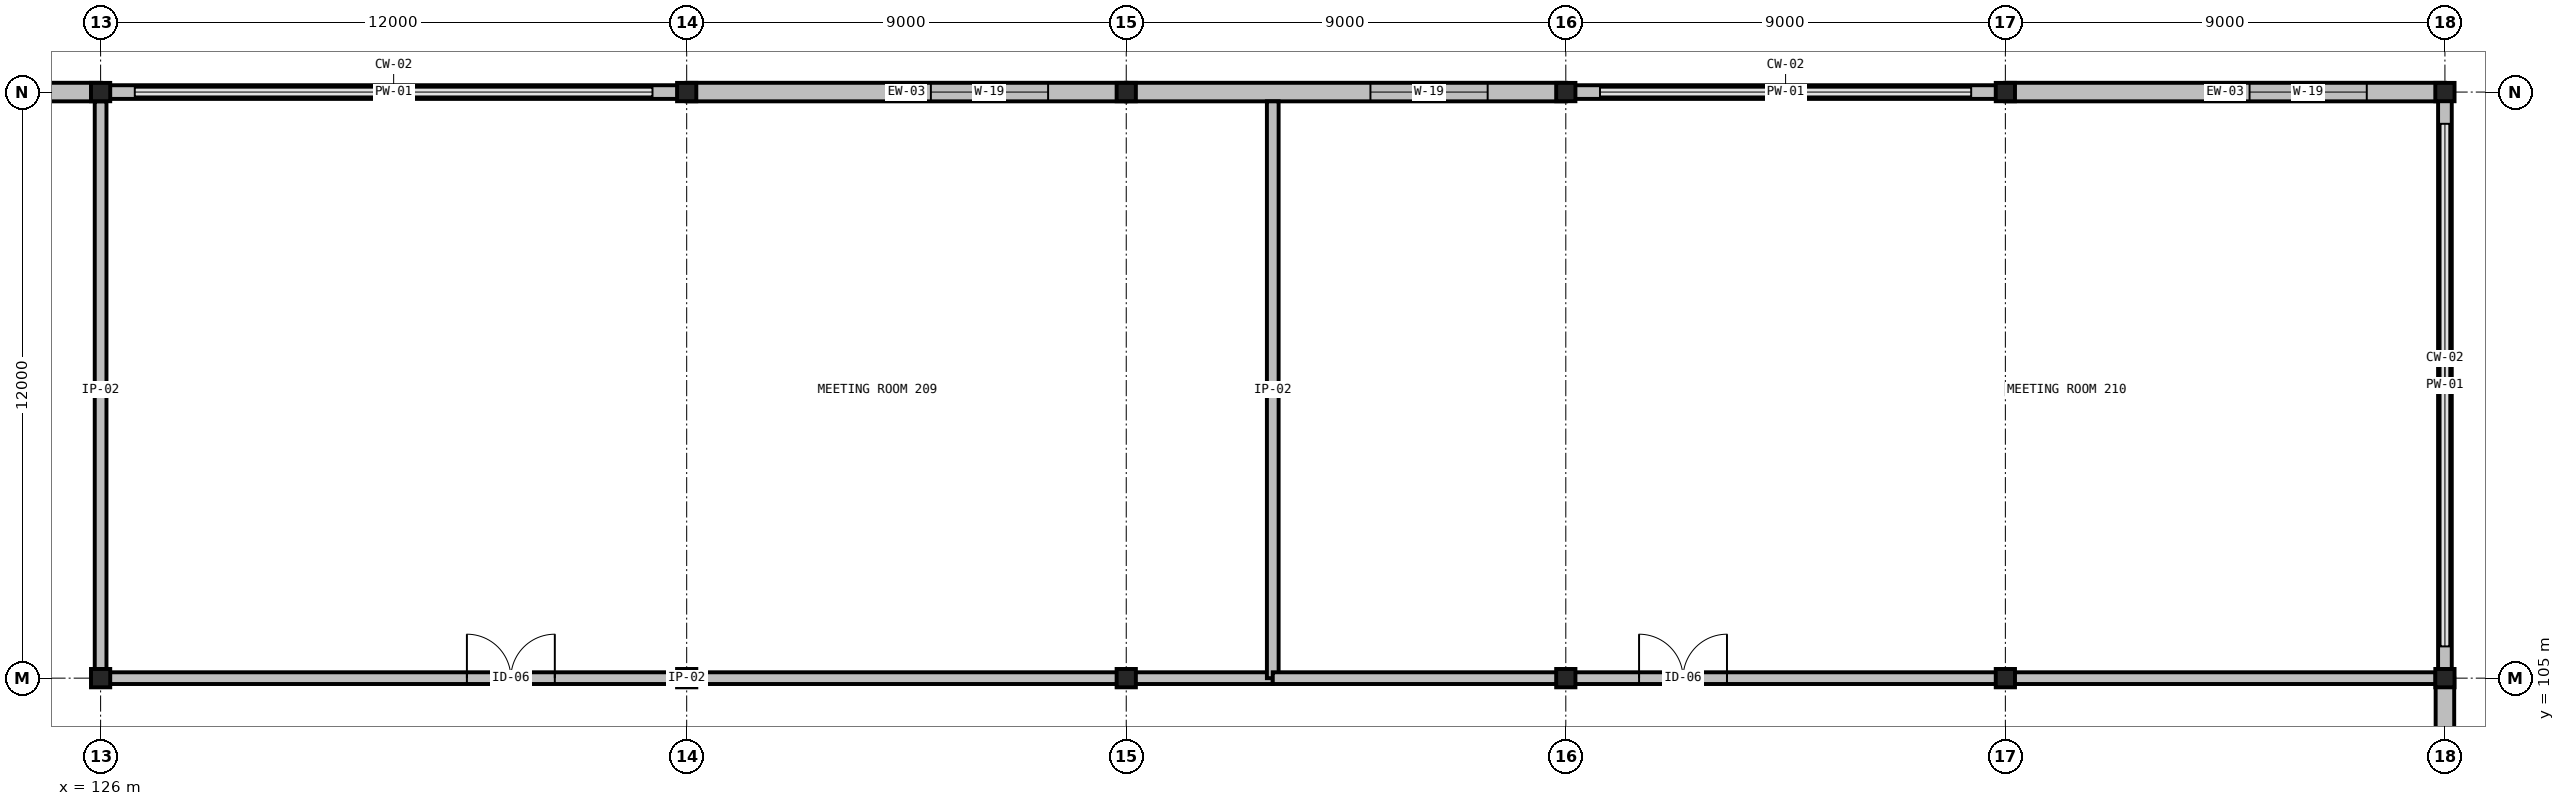
"""IFC4 building model, lengths in metres.
Left out: names, types, materials, properties, quantities, classifications, styles, units other than length and angle.
Written with IfcOpenShell. Run it as: python <this file> out.ifc"""

import sys

from ifc_helpers import new_model, si_unit, direction, frame, frame_2d, origin, origin_2d, place, context, subcontext, project, spatial, rectangle, i_section, extrude, element, fill, save


model = new_model("IFC4")
c1 = context("Model", 3, precision=1e-05, world=origin(), true_north=direction((0.0, 1.0)))
c2 = subcontext(c1, "Body", "Model", "MODEL_VIEW")
j1 = project(units=[si_unit("LENGTHUNIT", "METRE"), si_unit("PLANEANGLEUNIT", "RADIAN")], contexts=[c1])
p1 = place(None, origin())
s1 = spatial("IfcSite", under=j1, at=p1, CompositionType="ELEMENT")
p2 = place(p1, origin())
s2 = spatial("IfcBuilding", under=s1, at=p2, CompositionType="ELEMENT")
p3 = place(p2, frame((0.0, 0.0, 12.0)))
s3 = spatial("IfcBuildingStorey", under=s2, at=p3, CompositionType="ELEMENT", Elevation=12.0)
for number, where, z_axis, x_axis in (
    (1, (126.0, 105.0, 0.0), (0.0, 0.0, 1.0), (1.0, 0.0, 0.0)),
    (2, (126.0, 117.0, 0.0), (0.0, 0.0, 1.0), (1.0, 0.0, 0.0)),
    (3, (138.0, 105.0, 0.0), (0.0, 0.0, 1.0), (1.0, 0.0, 0.0)),
    (4, (138.0, 117.0, 0.0), (0.0, 0.0, 1.0), (1.0, 0.0, 0.0)),
    (5, (147.0, 105.0, 0.0), (0.0, 0.0, 1.0), (1.0, 0.0, 0.0)),
    (6, (147.0, 117.0, 0.0), (0.0, 0.0, 1.0), (1.0, 0.0, 0.0)),
    (7, (156.0, 105.0, 0.0), (0.0, 0.0, 1.0), (1.0, 0.0, 0.0)),
    (8, (156.0, 117.0, 0.0), (0.0, 0.0, 1.0), (1.0, 0.0, 0.0)),
    (9, (165.0, 105.0, 0.0), (0.0, 0.0, 1.0), (1.0, 0.0, 0.0)),
    (10, (165.0, 117.0, 0.0), (0.0, 0.0, 1.0), (1.0, 0.0, 0.0)),
    (11, (174.0, 105.0, 0.0), (0.0, 0.0, 1.0), (1.0, 0.0, 0.0)),
    (12, (174.0, 117.0, 0.0), (0.0, 0.0, 1.0), (1.0, 0.0, 0.0)),
):
    element("IfcColumn", number, at=place(p3, frame(where, z_axis=z_axis, x_axis=x_axis)), inside=s3, PredefinedType="COLUMN", context=c2, shape_type="SweptSolid", body=[
        extrude(i_section(OverallWidth=0.394, OverallDepth=0.375, WebThickness=0.017, FlangeThickness=0.028, FilletRadius=0.031, at=origin_2d()), origin(), (0.0, 0.0, 1.0), 6.0),
    ])
p4 = place(p3, frame((126.0, 117.0, 0.0), z_axis=(0.0, 0.0, 1.0), x_axis=(-1.0, 0.0, 0.0)))
e13 = element("IfcWall", 13, at=p4, inside=s3, PredefinedType="STANDARD", context=c2, shape_type="SweptSolid", body=[
    extrude(rectangle(XDim=12.0, YDim=0.38, at=frame_2d((6.0, 0.0))), origin(), (0.0, 0.0, 1.0), 4.746),
])
p5 = place(p4, frame((1.6, 0.0, 0.9)))
e14 = element("IfcOpeningElement", 14, at=p5, cuts=e13, PredefinedType="OPENING", context=c2, shape_type="SweptSolid", body=[
    extrude(rectangle(XDim=2.4, YDim=2.15, at=frame_2d((1.2, 1.075))), frame((0.0, 0.205, 0.0), z_axis=(0.0, -1.0, 0.0), x_axis=(1.0, 0.0, 0.0)), (0.0, 0.0, 1.0), 0.41),
])
p6 = place(p3, frame((138.0, 117.0, 0.0), z_axis=(0.0, 0.0, 1.0), x_axis=(-1.0, 0.0, 0.0)))
e15 = element("IfcWall", 15, at=p6, inside=s3, PredefinedType="PARAPET", context=c2, shape_type="SweptSolid", body=[
    extrude(rectangle(XDim=12.0, YDim=0.28, at=frame_2d((6.0, 0.0))), origin(), (0.0, 0.0, 1.0), 0.2),
])
p7 = place(p3, frame((147.0, 117.0, 0.0), z_axis=(0.0, 0.0, 1.0), x_axis=(-1.0, 0.0, 0.0)))
e16 = element("IfcWall", 16, at=p7, inside=s3, PredefinedType="STANDARD", context=c2, shape_type="SweptSolid", body=[
    extrude(rectangle(XDim=9.0, YDim=0.38, at=frame_2d((4.5, 0.0))), origin(), (0.0, 0.0, 1.0), 4.746),
])
p8 = place(p7, frame((1.6, 0.0, 0.9)))
e17 = element("IfcOpeningElement", 17, at=p8, cuts=e16, PredefinedType="OPENING", context=c2, shape_type="SweptSolid", body=[
    extrude(rectangle(XDim=2.4, YDim=2.15, at=frame_2d((1.2, 1.075))), frame((0.0, 0.205, 0.0), z_axis=(0.0, -1.0, 0.0), x_axis=(1.0, 0.0, 0.0)), (0.0, 0.0, 1.0), 0.41),
])
p9 = place(p3, frame((156.0, 117.0, 0.0), z_axis=(0.0, 0.0, 1.0), x_axis=(-1.0, 0.0, 0.0)))
e18 = element("IfcWall", 18, at=p9, inside=s3, PredefinedType="STANDARD", context=c2, shape_type="SweptSolid", body=[
    extrude(rectangle(XDim=9.0, YDim=0.38, at=frame_2d((4.5, 0.0))), origin(), (0.0, 0.0, 1.0), 4.746),
])
p10 = place(p9, frame((1.6, 0.0, 0.9)))
e19 = element("IfcOpeningElement", 19, at=p10, cuts=e18, PredefinedType="OPENING", context=c2, shape_type="SweptSolid", body=[
    extrude(rectangle(XDim=2.4, YDim=2.15, at=frame_2d((1.2, 1.075))), frame((0.0, 0.205, 0.0), z_axis=(0.0, -1.0, 0.0), x_axis=(1.0, 0.0, 0.0)), (0.0, 0.0, 1.0), 0.41),
])
p11 = place(p3, frame((165.0, 117.0, 0.0), z_axis=(0.0, 0.0, 1.0), x_axis=(-1.0, 0.0, 0.0)))
e20 = element("IfcWall", 20, at=p11, inside=s3, PredefinedType="PARAPET", context=c2, shape_type="SweptSolid", body=[
    extrude(rectangle(XDim=9.0, YDim=0.28, at=frame_2d((4.5, 0.0))), origin(), (0.0, 0.0, 1.0), 0.2),
])
p12 = place(p3, frame((174.0, 117.0, 0.0), z_axis=(0.0, 0.0, 1.0), x_axis=(-1.0, 0.0, 0.0)))
e21 = element("IfcWall", 21, at=p12, inside=s3, PredefinedType="STANDARD", context=c2, shape_type="SweptSolid", body=[
    extrude(rectangle(XDim=9.0, YDim=0.38, at=frame_2d((4.5, 0.0))), origin(), (0.0, 0.0, 1.0), 4.746),
])
p13 = place(p12, frame((1.6, 0.0, 0.9)))
e22 = element("IfcOpeningElement", 22, at=p13, cuts=e21, PredefinedType="OPENING", context=c2, shape_type="SweptSolid", body=[
    extrude(rectangle(XDim=2.4, YDim=2.15, at=frame_2d((1.2, 1.075))), frame((0.0, 0.205, 0.0), z_axis=(0.0, -1.0, 0.0), x_axis=(1.0, 0.0, 0.0)), (0.0, 0.0, 1.0), 0.41),
])
p14 = place(p3, frame((174.0, 96.0, 0.0), z_axis=(0.0, 0.0, 1.0), x_axis=(0.0, 1.0, 0.0)))
e23 = element("IfcWall", 23, at=p14, inside=s3, PredefinedType="STANDARD", context=c2, shape_type="SweptSolid", body=[
    extrude(rectangle(XDim=9.0, YDim=0.38, at=frame_2d((4.5, 0.0))), origin(), (0.0, 0.0, 1.0), 5.239),
])
p15 = place(p3, frame((174.0, 105.0, 0.0), z_axis=(0.0, 0.0, 1.0), x_axis=(0.0, 1.0, 0.0)))
e24 = element("IfcWall", 24, at=p15, inside=s3, PredefinedType="PARAPET", context=c2, shape_type="SweptSolid", body=[
    extrude(rectangle(XDim=12.0, YDim=0.28, at=frame_2d((6.0, 0.0))), origin(), (0.0, 0.0, 1.0), 0.2),
])
p16 = place(p3, frame((126.0, 105.0, 0.0), z_axis=(0.0, 0.0, 1.0), x_axis=(1.0, 0.0, 0.0)))
e25 = element("IfcWall", 25, at=p16, inside=s3, PredefinedType="PARTITIONING", context=c2, shape_type="SweptSolid", body=[
    extrude(rectangle(XDim=24.0, YDim=0.24, at=frame_2d((12.0, 0.0))), origin(), (0.0, 0.0, 1.0), 4.872),
])
p17 = place(p16, frame((7.5, 0.0, 0.0)))
e26 = element("IfcOpeningElement", 26, at=p17, cuts=e25, PredefinedType="OPENING", context=c2, shape_type="SweptSolid", body=[
    extrude(rectangle(XDim=1.8, YDim=2.3, at=frame_2d((0.9, 1.15))), frame((0.0, 0.135, 0.0), z_axis=(0.0, -1.0, 0.0), x_axis=(1.0, 0.0, 0.0)), (0.0, 0.0, 1.0), 0.27),
])
p18 = place(p3, frame((150.0, 105.0, 0.0), z_axis=(0.0, 0.0, 1.0), x_axis=(0.0, 1.0, 0.0)))
e27 = element("IfcWall", 27, at=p18, inside=s3, PredefinedType="PARTITIONING", context=c2, shape_type="SweptSolid", body=[
    extrude(rectangle(XDim=11.81, YDim=0.24, at=frame_2d((5.905, 0.0))), origin(), (0.0, 0.0, 1.0), 5.65),
])
p19 = place(p3, frame((126.0, 116.81, 0.0), z_axis=(0.0, 0.0, 1.0), x_axis=(0.0, -1.0, 0.0)))
e28 = element("IfcWall", 28, at=p19, inside=s3, PredefinedType="PARTITIONING", context=c2, shape_type="SweptSolid", body=[
    extrude(rectangle(XDim=11.81, YDim=0.24, at=frame_2d((5.905, 0.0))), origin(), (0.0, 0.0, 1.0), 4.8),
])
p20 = place(p3, frame((150.0, 105.0, 0.0), z_axis=(0.0, 0.0, 1.0), x_axis=(1.0, 0.0, 0.0)))
e29 = element("IfcWall", 29, at=p20, inside=s3, PredefinedType="PARTITIONING", context=c2, shape_type="SweptSolid", body=[
    extrude(rectangle(XDim=23.81, YDim=0.24, at=frame_2d((11.905, 0.0))), origin(), (0.0, 0.0, 1.0), 4.957),
])
p21 = place(p20, frame((7.5, 0.0, 0.0)))
e30 = element("IfcOpeningElement", 30, at=p21, cuts=e29, PredefinedType="OPENING", context=c2, shape_type="SweptSolid", body=[
    extrude(rectangle(XDim=1.8, YDim=2.3, at=frame_2d((0.9, 1.15))), frame((0.0, 0.135, 0.0), z_axis=(0.0, -1.0, 0.0), x_axis=(1.0, 0.0, 0.0)), (0.0, 0.0, 1.0), 0.27),
])
p22 = place(p8, origin())
e31 = element("IfcWindow", 31, at=p22, inside=s3, PartitioningType="DOUBLE_PANEL_VERTICAL", PredefinedType="WINDOW", context=c2, shape_type="SweptSolid", body=[
    extrude(rectangle(XDim=2.4, YDim=2.15, at=frame_2d((1.2, 1.075))), frame((0.0, 0.03, 0.0), z_axis=(0.0, -1.0, 0.0), x_axis=(1.0, 0.0, 0.0)), (0.0, 0.0, 1.0), 0.06),
])
fill(e17, e31)
p23 = place(p10, origin())
e32 = element("IfcWindow", 32, at=p23, inside=s3, PartitioningType="DOUBLE_PANEL_VERTICAL", PredefinedType="WINDOW", context=c2, shape_type="SweptSolid", body=[
    extrude(rectangle(XDim=2.4, YDim=2.15, at=frame_2d((1.2, 1.075))), frame((0.0, 0.03, 0.0), z_axis=(0.0, -1.0, 0.0), x_axis=(1.0, 0.0, 0.0)), (0.0, 0.0, 1.0), 0.06),
])
fill(e19, e32)
p24 = place(p13, origin())
e33 = element("IfcWindow", 33, at=p24, inside=s3, PartitioningType="DOUBLE_PANEL_VERTICAL", PredefinedType="WINDOW", context=c2, shape_type="SweptSolid", body=[
    extrude(rectangle(XDim=2.4, YDim=2.15, at=frame_2d((1.2, 1.075))), frame((0.0, 0.03, 0.0), z_axis=(0.0, -1.0, 0.0), x_axis=(1.0, 0.0, 0.0)), (0.0, 0.0, 1.0), 0.06),
])
fill(e22, e33)
p25 = place(p17, origin())
e34 = element("IfcDoor", 34, at=p25, inside=s3, OperationType="DOUBLE_DOOR_SINGLE_SWING", PredefinedType="DOOR", context=c2, shape_type="SweptSolid", body=[
    extrude(rectangle(XDim=1.8, YDim=2.3, at=frame_2d((0.9, 1.15))), frame((0.0, 0.025, 0.0), z_axis=(0.0, -1.0, 0.0), x_axis=(1.0, 0.0, 0.0)), (0.0, 0.0, 1.0), 0.05),
])
fill(e26, e34)
p26 = place(p21, origin())
e35 = element("IfcDoor", 35, at=p26, inside=s3, OperationType="DOUBLE_DOOR_SINGLE_SWING", PredefinedType="DOOR", context=c2, shape_type="SweptSolid", body=[
    extrude(rectangle(XDim=1.8, YDim=2.3, at=frame_2d((0.9, 1.15))), frame((0.0, 0.025, 0.0), z_axis=(0.0, -1.0, 0.0), x_axis=(1.0, 0.0, 0.0)), (0.0, 0.0, 1.0), 0.05),
])
fill(e30, e35)
save(model, sys.argv[1])
